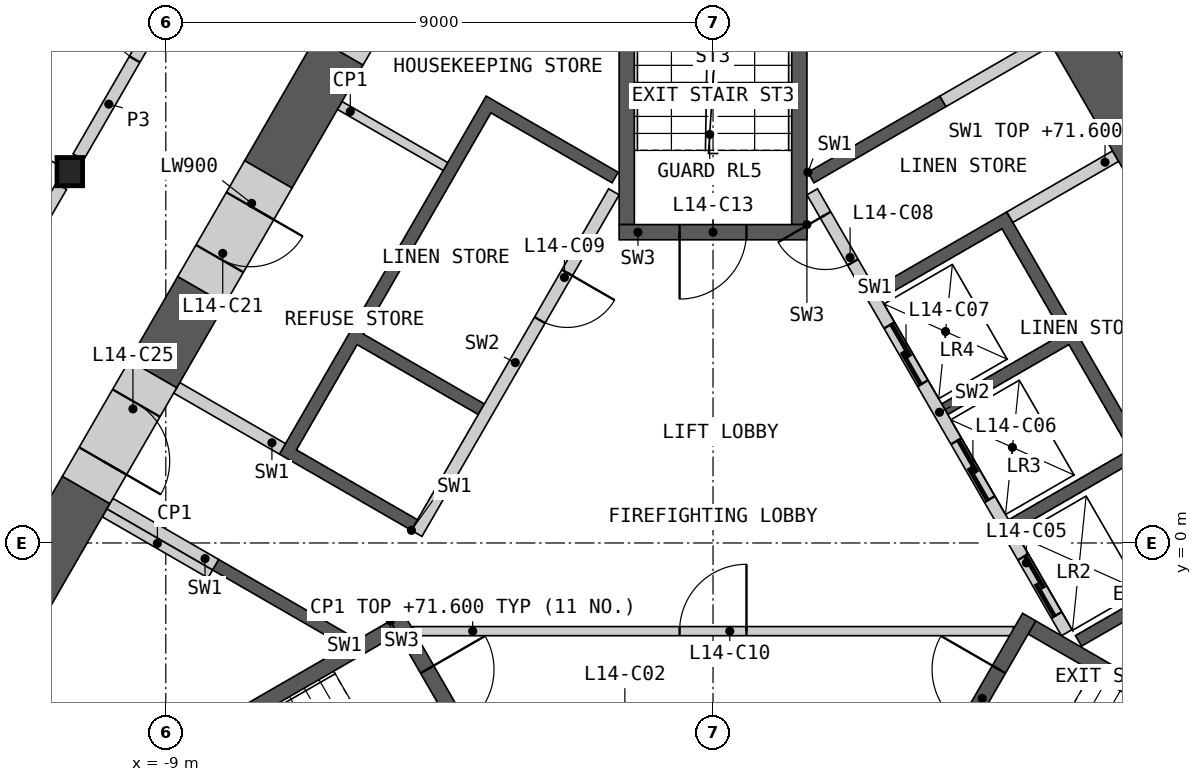
"""IFC4 building model, lengths in metres.
Left out: names, types, materials, properties, quantities, classifications, styles, units other than length and angle.
Written with IfcOpenShell. Run it as: python <this file> out.ifc"""

import sys

from ifc_helpers import new_model, si_unit, direction, frame, frame_2d, origin, origin_2d, place, context, subcontext, project, spatial, polyline, rectangle, i_section, outline, extrude, element, fill, save


model = new_model("IFC4")
c1 = context("Model", 3, precision=1e-05, world=origin(), true_north=direction((0.0, 1.0)))
c2 = subcontext(c1, "Body", "Model", "MODEL_VIEW")
j1 = project(units=[si_unit("LENGTHUNIT", "METRE"), si_unit("PLANEANGLEUNIT", "RADIAN")], contexts=[c1])
p1 = place(None, origin())
s1 = spatial("IfcSite", under=j1, at=p1, CompositionType="ELEMENT")
p2 = place(p1, origin())
s2 = spatial("IfcBuilding", under=s1, at=p2, CompositionType="ELEMENT")
p3 = place(p2, frame((0.0, 0.0, 67.8)))
s3 = spatial("IfcBuildingStorey", under=s2, at=p3, CompositionType="ELEMENT", Elevation=67.8)
p4 = place(p3, frame((-10.578, 6.107, 0.0), z_axis=(0.0, 0.0, 1.0), x_axis=(1.0, 0.0, 0.0)))
e1 = element("IfcColumn", 1, at=p4, inside=s3, PredefinedType="COLUMN", context=c2, shape_type="SweptSolid", body=[
    extrude(i_section(OverallWidth=0.421, OverallDepth=0.465, WebThickness=0.045, FlangeThickness=0.072, at=origin_2d()), origin(), (0.0, 0.0, 1.0), 4.2),
])
p5 = place(p3, origin())
e2 = element("IfcWall", 2, at=p5, inside=s3, PredefinedType="SHEAR", context=c2, shape_type="SweptSolid", body=[
    extrude(outline(polyline([(1.561, 6.097), (3.731, 7.35), (3.831, 7.177), (1.66, 5.924), (1.561, 6.097)])), origin(), (0.0, 0.0, 1.0), 3.8),
])
p6 = place(p3, origin())
e3 = element("IfcWall", 3, at=p6, inside=s3, PredefinedType="SHEAR", context=c2, shape_type="SweptSolid", body=[
    extrude(outline(polyline([(2.66, 4.192), (4.831, 5.445), (8.231, -0.444), (6.061, -1.697), (5.96, -1.524), (7.952, -0.374), (6.952, 1.358), (4.96, 0.208), (4.861, 0.381), (6.852, 1.531), (5.852, 3.263), (3.861, 2.113), (3.76, 2.287), (5.752, 3.437), (4.752, 5.169), (2.76, 4.019), (2.66, 4.192)])), origin(), (0.0, 0.0, 1.0), 3.8),
])
p7 = place(p3, frame((5.817, -1.476, 0.0), z_axis=(0.0, 0.0, 1.0), x_axis=(-0.500002616675, 0.866023893041, 0.0)))
e4 = element("IfcWall", 4, at=p7, inside=s3, PredefinedType="SOLIDWALL", context=c2, shape_type="SweptSolid", body=[
    extrude(rectangle(XDim=8.373, YDim=0.2, at=frame_2d((4.187, 0.0))), origin(), (0.0, 0.0, 1.0), 3.8),
])
p8 = place(p7, frame((0.337, 0.0, 0.0)))
e5 = element("IfcOpeningElement", 5, at=p8, cuts=e4, PredefinedType="OPENING", context=c2, shape_type="SweptSolid", body=[
    extrude(rectangle(XDim=1.1, YDim=2.1, at=frame_2d((0.55, 1.05))), frame((0.0, 0.11, 0.0), z_axis=(0.0, -1.0, 0.0), x_axis=(1.0, 0.0, 0.0)), (0.0, 0.0, 1.0), 0.22),
])
p9 = place(p7, frame((2.537, 0.0, 0.0)))
e6 = element("IfcOpeningElement", 6, at=p9, cuts=e4, PredefinedType="OPENING", context=c2, shape_type="SweptSolid", body=[
    extrude(rectangle(XDim=1.1, YDim=2.1, at=frame_2d((0.55, 1.05))), frame((0.0, 0.11, 0.0), z_axis=(0.0, -1.0, 0.0), x_axis=(1.0, 0.0, 0.0)), (0.0, 0.0, 1.0), 0.22),
])
p10 = place(p7, frame((4.737, 0.0, 0.0)))
e7 = element("IfcOpeningElement", 7, at=p10, cuts=e4, PredefinedType="OPENING", context=c2, shape_type="SweptSolid", body=[
    extrude(rectangle(XDim=1.1, YDim=2.1, at=frame_2d((0.55, 1.05))), frame((0.0, 0.11, 0.0), z_axis=(0.0, -1.0, 0.0), x_axis=(1.0, 0.0, 0.0)), (0.0, 0.0, 1.0), 0.22),
])
p11 = place(p7, frame((7.037, 0.0, 0.0)))
e8 = element("IfcOpeningElement", 8, at=p11, cuts=e4, PredefinedType="OPENING", context=c2, shape_type="SweptSolid", body=[
    extrude(rectangle(XDim=0.9, YDim=2.1, at=frame_2d((0.45, 1.05))), frame((0.0, 0.11, 0.0), z_axis=(0.0, -1.0, 0.0), x_axis=(1.0, 0.0, 0.0)), (0.0, 0.0, 1.0), 0.22),
])
p12 = place(p3, frame((4.881, 5.358, 0.0), z_axis=(0.0, 0.0, 1.0), x_axis=(0.866035824272, 0.499981950752, 0.0)))
e9 = element("IfcWall", 9, at=p12, inside=s3, PredefinedType="SHEAR", context=c2, shape_type="SweptSolid", body=[
    extrude(rectangle(XDim=2.009, YDim=0.2, at=frame_2d((1.004, 0.0))), origin(), (0.0, 0.0, 1.0), 3.8),
])
p13 = place(p3, frame((3.781, 7.263, 0.0), z_axis=(0.0, 0.0, 1.0), x_axis=(0.865983199114, 0.50007309351, 0.0)))
e10 = element("IfcWall", 10, at=p13, inside=s3, PredefinedType="SHEAR", context=c2, shape_type="SweptSolid", body=[
    extrude(rectangle(XDim=2.009, YDim=0.2, at=frame_2d((1.004, 0.0))), origin(), (0.0, 0.0, 1.0), 3.8),
])
p14 = place(p3, origin())
e11 = element("IfcWall", 11, at=p14, inside=s3, PredefinedType="SHEAR", context=c2, shape_type="SweptSolid", body=[
    extrude(outline(polyline([(-6.061, -1.697), (-8.231, -0.444), (-8.131, -0.271), (-5.96, -1.524), (-6.061, -1.697)])), origin(), (0.0, 0.0, 1.0), 3.8),
])
p15 = place(p3, origin())
e12 = element("IfcWall", 12, at=p15, inside=s3, PredefinedType="SHEAR", context=c2, shape_type="SweptSolid", body=[
    extrude(outline(polyline([(-4.96, 0.208), (-7.131, 1.461), (-3.731, 7.35), (-1.561, 6.097), (-1.66, 5.924), (-3.652, 7.074), (-5.752, 3.437), (-3.76, 2.287), (-3.861, 2.113), (-5.852, 3.263), (-6.852, 1.531), (-4.861, 0.381), (-4.96, 0.208)])), origin(), (0.0, 0.0, 1.0), 3.8),
])
p16 = place(p3, frame((-1.631, 5.776, 0.0), z_axis=(0.0, 0.0, 1.0), x_axis=(-0.499992876559, -0.866029516466, 0.0)))
e13 = element("IfcWall", 13, at=p16, inside=s3, PredefinedType="SOLIDWALL", context=c2, shape_type="SweptSolid", body=[
    extrude(rectangle(XDim=6.486, YDim=0.2, at=frame_2d((3.243, 0.0))), origin(), (0.0, 0.0, 1.0), 3.8),
])
p17 = place(p16, frame((1.537, 0.0, 0.0)))
e14 = element("IfcOpeningElement", 14, at=p17, cuts=e13, PredefinedType="OPENING", context=c2, shape_type="SweptSolid", body=[
    extrude(rectangle(XDim=0.9, YDim=2.1, at=frame_2d((0.45, 1.05))), frame((0.0, 0.11, 0.0), z_axis=(0.0, -1.0, 0.0), x_axis=(1.0, 0.0, 0.0)), (0.0, 0.0, 1.0), 0.22),
])
p18 = place(p3, frame((-7.081, 1.548, 0.0), z_axis=(0.0, 0.0, 1.0), x_axis=(-0.865983199114, 0.50007309351, 0.0)))
e15 = element("IfcWall", 15, at=p18, inside=s3, PredefinedType="SHEAR", context=c2, shape_type="SweptSolid", body=[
    extrude(rectangle(XDim=2.009, YDim=0.2, at=frame_2d((1.004, 0.0))), origin(), (0.0, 0.0, 1.0), 3.8),
])
p19 = place(p3, frame((-8.181, -0.357, 0.0), z_axis=(0.0, 0.0, 1.0), x_axis=(-0.866035824272, 0.499981950752, 0.0)))
e16 = element("IfcWall", 16, at=p19, inside=s3, PredefinedType="SHEAR", context=c2, shape_type="SweptSolid", body=[
    extrude(rectangle(XDim=2.009, YDim=0.2, at=frame_2d((1.004, 0.0))), origin(), (0.0, 0.0, 1.0), 3.8),
])
p20 = place(p3, frame((-4.941, -1.45, 0.0), z_axis=(0.0, 0.0, 1.0), x_axis=(1.0, 0.0, 0.0)))
e17 = element("IfcWall", 17, at=p20, inside=s3, PredefinedType="PARTITIONING", context=c2, shape_type="SweptSolid", body=[
    extrude(rectangle(XDim=9.882, YDim=0.15, at=frame_2d((4.941, 0.0))), origin(), (0.0, 0.0, 1.0), 3.8),
])
p21 = place(p20, frame((4.391, 0.0, 0.0)))
e18 = element("IfcOpeningElement", 18, at=p21, cuts=e17, PredefinedType="OPENING", context=c2, shape_type="SweptSolid", body=[
    extrude(rectangle(XDim=1.1, YDim=2.1, at=frame_2d((0.55, 1.05))), frame((0.0, 0.085, 0.0), z_axis=(0.0, -1.0, 0.0), x_axis=(1.0, 0.0, 0.0)), (0.0, 0.0, 1.0), 0.17),
])
p22 = place(p3, origin())
e19 = element("IfcWall", 19, at=p22, inside=s3, PredefinedType="SHEAR", context=c2, shape_type="SweptSolid", body=[
    extrude(outline(polyline([(-5.307, -1.281), (-10.374, -4.206), (-10.032, -4.298), (-5.182, -1.498), (-5.307, -1.281)])), origin(), (0.0, 0.0, 1.0), 3.8),
])
p23 = place(p3, frame((-5.199, -1.219, 0.0), z_axis=(0.0, 0.0, 1.0), x_axis=(0.499982516597, -0.866035497597, 0.0)))
e20 = element("IfcWall", 20, at=p23, inside=s3, PredefinedType="SHEAR", context=c2, shape_type="SweptSolid", body=[
    extrude(rectangle(XDim=3.088, YDim=0.25, at=frame_2d((1.544, 0.0))), origin(), (0.0, 0.0, 1.0), 3.8),
])
p24 = place(p23, frame((0.994, 0.0, 0.0)))
e21 = element("IfcOpeningElement", 21, at=p24, cuts=e20, PredefinedType="OPENING", context=c2, shape_type="SweptSolid", body=[
    extrude(rectangle(XDim=1.1, YDim=2.1, at=frame_2d((0.55, 1.05))), frame((0.0, 0.135, 0.0), z_axis=(0.0, -1.0, 0.0), x_axis=(1.0, 0.0, 0.0)), (0.0, 0.0, 1.0), 0.27),
])
p25 = place(p3, origin())
e22 = element("IfcWall", 22, at=p25, inside=s3, PredefinedType="SHEAR", context=c2, shape_type="SweptSolid", body=[
    extrude(outline(polyline([(10.032, -4.298), (10.374, -4.206), (5.307, -1.281), (5.182, -1.498), (10.032, -4.298)])), origin(), (0.0, 0.0, 1.0), 3.8),
])
p26 = place(p3, frame((3.655, -3.893, 0.0), z_axis=(0.0, 0.0, 1.0), x_axis=(0.499982516597, 0.866035497597, 0.0)))
e23 = element("IfcWall", 23, at=p26, inside=s3, PredefinedType="SHEAR", context=c2, shape_type="SweptSolid", body=[
    extrude(rectangle(XDim=3.088, YDim=0.25, at=frame_2d((1.544, 0.0))), origin(), (0.0, 0.0, 1.0), 3.8),
])
p27 = place(p26, frame((0.994, 0.0, 0.0)))
e24 = element("IfcOpeningElement", 24, at=p27, cuts=e23, PredefinedType="OPENING", context=c2, shape_type="SweptSolid", body=[
    extrude(rectangle(XDim=1.1, YDim=2.1, at=frame_2d((0.55, 1.05))), frame((0.0, 0.135, 0.0), z_axis=(0.0, -1.0, 0.0), x_axis=(1.0, 0.0, 0.0)), (0.0, 0.0, 1.0), 0.27),
])
p28 = place(p3, origin())
e25 = element("IfcWall", 25, at=p28, inside=s3, PredefinedType="SHEAR", context=c2, shape_type="SweptSolid", body=[
    extrude(outline(polyline([(1.544, 5.237), (1.544, 11.087), (1.294, 10.837), (1.294, 5.237), (1.544, 5.237)])), origin(), (0.0, 0.0, 1.0), 3.8),
])
p29 = place(p3, origin())
e26 = element("IfcWall", 26, at=p29, inside=s3, PredefinedType="SHEAR", context=c2, shape_type="SweptSolid", body=[
    extrude(outline(polyline([(-1.294, 10.837), (-1.544, 11.087), (-1.544, 5.237), (-1.294, 5.237), (-1.294, 10.837)])), origin(), (0.0, 0.0, 1.0), 3.8),
])
p30 = place(p3, frame((1.544, 5.112, 0.0), z_axis=(0.0, 0.0, 1.0), x_axis=(-1.0, 0.0, 0.0)))
e27 = element("IfcWall", 27, at=p30, inside=s3, PredefinedType="SHEAR", context=c2, shape_type="SweptSolid", body=[
    extrude(rectangle(XDim=3.088, YDim=0.25, at=frame_2d((1.544, 0.0))), origin(), (0.0, 0.0, 1.0), 3.8),
])
p31 = place(p30, frame((0.994, 0.0, 0.0)))
e28 = element("IfcOpeningElement", 28, at=p31, cuts=e27, PredefinedType="OPENING", context=c2, shape_type="SweptSolid", body=[
    extrude(rectangle(XDim=1.1, YDim=2.1, at=frame_2d((0.55, 1.05))), frame((0.0, 0.135, 0.0), z_axis=(0.0, -1.0, 0.0), x_axis=(1.0, 0.0, 0.0)), (0.0, 0.0, 1.0), 0.27),
])
for number, where, z_axis, x_axis in (
    (29, (-8.268, -0.509, 0.0), (0.0, 0.0, 1.0), (-0.866, 0.5, 0.0)),
    (30, (-6.139, 7.196, 0.0), (0.0, 0.0, 1.0), (0.866, -0.5, 0.0)),
):
    element("IfcWall", number, at=place(p3, frame(where, z_axis=z_axis, x_axis=x_axis)), inside=s3, PredefinedType="PARTITIONING", context=c2, shape_type="SweptSolid", body=[
        extrude(rectangle(XDim=2.009, YDim=0.15, at=frame_2d((1.004, 0.0))), origin(), (0.0, 0.0, 1.0), 3.8),
    ])
p32 = place(p3, frame((7.807, 5.208, 0.0), z_axis=(0.0, 0.0, 1.0), x_axis=(-0.499986664161, 0.866033103098, 0.0)))
e31 = element("IfcWall", 31, at=p32, inside=s3, PredefinedType="SHEAR", context=c2, shape_type="SweptSolid", body=[
    extrude(rectangle(XDim=6.586, YDim=0.9, at=frame_2d((3.293, 0.0))), origin(), (0.0, 0.0, 1.0), 3.8),
])
p33 = place(p3, frame((-10.31, 0.872, 0.0), z_axis=(0.0, 0.0, 1.0), x_axis=(-0.499946751862, -0.866056144429, 0.0)))
e32 = element("IfcWall", 32, at=p33, inside=s3, PredefinedType="SHEAR", context=c2, shape_type="SweptSolid", body=[
    extrude(rectangle(XDim=2.889, YDim=0.9, at=frame_2d((1.445, 0.0))), origin(), (0.0, 0.0, 1.0), 3.8),
])
p34 = place(p3, frame((-6.145, 8.086, 0.0), z_axis=(0.0, 0.0, 1.0), x_axis=(-0.500026924946, -0.866009858102, 0.0)))
e33 = element("IfcWall", 33, at=p34, inside=s3, PredefinedType="SHEAR", context=c2, shape_type="SweptSolid", body=[
    extrude(rectangle(XDim=2.337, YDim=0.9, at=frame_2d((1.168, 0.0))), origin(), (0.0, 0.0, 1.0), 3.8),
])
p35 = place(p3, frame((-8.413, 4.157, 0.0), z_axis=(0.0, 0.0, 1.0), x_axis=(-0.499961121316, -0.86604784924, 0.0)))
e34 = element("IfcWall", 34, at=p35, inside=s3, PredefinedType="SHEAR", context=c2, shape_type="SweptSolid", body=[
    extrude(rectangle(XDim=1.594, YDim=0.9, at=frame_2d((0.797, 0.0))), origin(), (0.0, 0.0, 1.0), 3.8),
])
p36 = place(p3, frame((-7.313, 6.062, 0.0), z_axis=(0.0, 0.0, 1.0), x_axis=(-0.500077893725, -0.86598042715, 0.0)))
e35 = element("IfcWall", 35, at=p36, inside=s3, PredefinedType="SHEAR", context=c2, shape_type="SweptSolid", body=[
    extrude(rectangle(XDim=2.2, YDim=0.9, at=frame_2d((1.1, 0.0))), origin(), (0.0, 0.0, 1.0), 3.8),
])
p37 = place(p36, frame((0.6, 0.0, 0.0)))
e36 = element("IfcOpeningElement", 36, at=p37, cuts=e35, PredefinedType="OPENING", context=c2, shape_type="SweptSolid", body=[
    extrude(rectangle(XDim=1.0, YDim=2.1, at=frame_2d((0.5, 1.05))), frame((0.0, 0.46, 0.0), z_axis=(0.0, -1.0, 0.0), x_axis=(1.0, 0.0, 0.0)), (0.0, 0.0, 1.0), 0.92),
])
p38 = place(p3, frame((-5.045, 9.992, 0.0), z_axis=(0.0, 0.0, 1.0), x_axis=(-0.499898558967, -0.866083962871, 0.0)))
e37 = element("IfcWall", 37, at=p38, inside=s3, PredefinedType="SHEAR", context=c2, shape_type="SweptSolid", body=[
    extrude(rectangle(XDim=2.2, YDim=0.9, at=frame_2d((1.1, 0.0))), origin(), (0.0, 0.0, 1.0), 3.8),
])
p39 = place(p38, frame((0.6, 0.0, 0.0)))
e38 = element("IfcOpeningElement", 38, at=p39, cuts=e37, PredefinedType="OPENING", context=c2, shape_type="SweptSolid", body=[
    extrude(rectangle(XDim=1.0, YDim=2.1, at=frame_2d((0.5, 1.05))), frame((0.0, 0.46, 0.0), z_axis=(0.0, -1.0, 0.0), x_axis=(1.0, 0.0, 0.0)), (0.0, 0.0, 1.0), 0.92),
])
p40 = place(p3, frame((-9.21, 2.777, 0.0), z_axis=(0.0, 0.0, 1.0), x_axis=(-0.500077893725, -0.86598042715, 0.0)))
e39 = element("IfcWall", 39, at=p40, inside=s3, PredefinedType="SHEAR", context=c2, shape_type="SweptSolid", body=[
    extrude(rectangle(XDim=2.2, YDim=0.9, at=frame_2d((1.1, 0.0))), origin(), (0.0, 0.0, 1.0), 3.8),
])
p41 = place(p40, frame((0.55, 0.0, 0.0)))
e40 = element("IfcOpeningElement", 40, at=p41, cuts=e39, PredefinedType="OPENING", context=c2, shape_type="SweptSolid", body=[
    extrude(rectangle(XDim=1.1, YDim=2.1, at=frame_2d((0.55, 1.05))), frame((0.0, 0.46, 0.0), z_axis=(0.0, -1.0, 0.0), x_axis=(1.0, 0.0, 0.0)), (0.0, 0.0, 1.0), 0.92),
])
p42 = place(p3, frame((-15.728, -2.811, 0.0), z_axis=(0.0, 0.0, 1.0), x_axis=(0.49999175339, 0.866030164915, 0.0)))
e41 = element("IfcWall", 41, at=p42, inside=s3, PredefinedType="PARTITIONING", context=c2, shape_type="SweptSolid", body=[
    extrude(rectangle(XDim=10.019, YDim=0.2, at=frame_2d((5.009, 0.0))), origin(), (0.0, 0.0, 1.0), 3.8),
])
p43 = place(p42, frame((2.154, 0.0, 0.0)))
e42 = element("IfcOpeningElement", 42, at=p43, cuts=e41, PredefinedType="OPENING", context=c2, shape_type="SweptSolid", body=[
    extrude(rectangle(XDim=1.0, YDim=2.1, at=frame_2d((0.5, 1.05))), frame((0.0, 0.11, 0.0), z_axis=(0.0, -1.0, 0.0), x_axis=(1.0, 0.0, 0.0)), (0.0, 0.0, 1.0), 0.22),
])
p44 = place(p3, frame((-10.439, 6.35, 0.0), z_axis=(0.0, 0.0, 1.0), x_axis=(0.50001002959, 0.86601961312, 0.0)))
e43 = element("IfcWall", 43, at=p44, inside=s3, PredefinedType="PARTITIONING", context=c2, shape_type="SweptSolid", body=[
    extrude(rectangle(XDim=10.019, YDim=0.2, at=frame_2d((5.009, 0.0))), origin(), (0.0, 0.0, 1.0), 3.8),
])
p45 = place(p44, frame((6.865, 0.0, 0.0)))
e44 = element("IfcOpeningElement", 44, at=p45, cuts=e43, PredefinedType="OPENING", context=c2, shape_type="SweptSolid", body=[
    extrude(rectangle(XDim=1.0, YDim=2.1, at=frame_2d((0.5, 1.05))), frame((0.0, 0.11, 0.0), z_axis=(0.0, -1.0, 0.0), x_axis=(1.0, 0.0, 0.0)), (0.0, 0.0, 1.0), 0.22),
])
p46 = place(p44, frame((1.854, 0.0, 0.0)))
e45 = element("IfcOpeningElement", 45, at=p46, cuts=e43, PredefinedType="OPENING", context=c2, shape_type="SweptSolid", body=[
    extrude(rectangle(XDim=1.0, YDim=2.1, at=frame_2d((0.5, 1.05))), frame((0.0, 0.11, 0.0), z_axis=(0.0, -1.0, 0.0), x_axis=(1.0, 0.0, 0.0)), (0.0, 0.0, 1.0), 0.22),
])
p47 = place(p3, frame((5.429, 15.026, 0.0), z_axis=(0.0, 0.0, 1.0), x_axis=(0.50001002959, -0.86601961312, 0.0)))
e46 = element("IfcWall", 46, at=p47, inside=s3, PredefinedType="PARTITIONING", context=c2, shape_type="SweptSolid", body=[
    extrude(rectangle(XDim=10.019, YDim=0.2, at=frame_2d((5.009, 0.0))), origin(), (0.0, 0.0, 1.0), 3.8),
])
p48 = place(p47, frame((7.165, 0.0, 0.0)))
e47 = element("IfcOpeningElement", 47, at=p48, cuts=e46, PredefinedType="OPENING", context=c2, shape_type="SweptSolid", body=[
    extrude(rectangle(XDim=1.0, YDim=2.1, at=frame_2d((0.5, 1.05))), frame((0.0, 0.11, 0.0), z_axis=(0.0, -1.0, 0.0), x_axis=(1.0, 0.0, 0.0)), (0.0, 0.0, 1.0), 0.22),
])
p49 = place(p8, origin())
e48 = element("IfcDoor", 48, at=p49, inside=s3, OperationType="SLIDING_TO_LEFT", PredefinedType="DOOR", context=c2, shape_type="SweptSolid", body=[
    extrude(rectangle(XDim=1.1, YDim=2.1, at=frame_2d((0.55, 1.05))), frame((0.0, 0.025, 0.0), z_axis=(0.0, -1.0, 0.0), x_axis=(1.0, 0.0, 0.0)), (0.0, 0.0, 1.0), 0.05),
])
fill(e5, e48)
p50 = place(p9, origin())
e49 = element("IfcDoor", 49, at=p50, inside=s3, OperationType="SLIDING_TO_LEFT", PredefinedType="DOOR", context=c2, shape_type="SweptSolid", body=[
    extrude(rectangle(XDim=1.1, YDim=2.1, at=frame_2d((0.55, 1.05))), frame((0.0, 0.025, 0.0), z_axis=(0.0, -1.0, 0.0), x_axis=(1.0, 0.0, 0.0)), (0.0, 0.0, 1.0), 0.05),
])
fill(e6, e49)
p51 = place(p10, origin())
e50 = element("IfcDoor", 50, at=p51, inside=s3, OperationType="SLIDING_TO_LEFT", PredefinedType="DOOR", context=c2, shape_type="SweptSolid", body=[
    extrude(rectangle(XDim=1.1, YDim=2.1, at=frame_2d((0.55, 1.05))), frame((0.0, 0.025, 0.0), z_axis=(0.0, -1.0, 0.0), x_axis=(1.0, 0.0, 0.0)), (0.0, 0.0, 1.0), 0.05),
])
fill(e7, e50)
p52 = place(p11, origin())
e51 = element("IfcDoor", 51, at=p52, inside=s3, OperationType="SINGLE_SWING_RIGHT", PredefinedType="DOOR", context=c2, shape_type="SweptSolid", body=[
    extrude(rectangle(XDim=0.9, YDim=2.1, at=frame_2d((0.45, 1.05))), frame((0.0, 0.025, 0.0), z_axis=(0.0, -1.0, 0.0), x_axis=(1.0, 0.0, 0.0)), (0.0, 0.0, 1.0), 0.05),
])
fill(e8, e51)
p53 = place(p17, origin())
e52 = element("IfcDoor", 52, at=p53, inside=s3, OperationType="SINGLE_SWING_LEFT", PredefinedType="DOOR", context=c2, shape_type="SweptSolid", body=[
    extrude(rectangle(XDim=0.9, YDim=2.1, at=frame_2d((0.45, 1.05))), frame((0.0, 0.025, 0.0), z_axis=(0.0, -1.0, 0.0), x_axis=(1.0, 0.0, 0.0)), (0.0, 0.0, 1.0), 0.05),
])
fill(e14, e52)
p54 = place(p21, origin())
e53 = element("IfcDoor", 53, at=p54, inside=s3, OperationType="SINGLE_SWING_RIGHT", PredefinedType="DOOR", context=c2, shape_type="SweptSolid", body=[
    extrude(rectangle(XDim=1.1, YDim=2.1, at=frame_2d((0.55, 1.05))), frame((0.0, 0.025, 0.0), z_axis=(0.0, -1.0, 0.0), x_axis=(1.0, 0.0, 0.0)), (0.0, 0.0, 1.0), 0.05),
])
fill(e18, e53)
p55 = place(p24, origin())
e54 = element("IfcDoor", 54, at=p55, inside=s3, OperationType="SINGLE_SWING_LEFT", PredefinedType="DOOR", context=c2, shape_type="SweptSolid", body=[
    extrude(rectangle(XDim=1.1, YDim=2.1, at=frame_2d((0.55, 1.05))), frame((0.0, 0.025, 0.0), z_axis=(0.0, -1.0, 0.0), x_axis=(1.0, 0.0, 0.0)), (0.0, 0.0, 1.0), 0.05),
])
fill(e21, e54)
p56 = place(p27, origin())
e55 = element("IfcDoor", 55, at=p56, inside=s3, OperationType="SINGLE_SWING_RIGHT", PredefinedType="DOOR", context=c2, shape_type="SweptSolid", body=[
    extrude(rectangle(XDim=1.1, YDim=2.1, at=frame_2d((0.55, 1.05))), frame((0.0, 0.025, 0.0), z_axis=(0.0, -1.0, 0.0), x_axis=(1.0, 0.0, 0.0)), (0.0, 0.0, 1.0), 0.05),
])
fill(e24, e55)
p57 = place(p31, origin())
e56 = element("IfcDoor", 56, at=p57, inside=s3, OperationType="SINGLE_SWING_RIGHT", PredefinedType="DOOR", context=c2, shape_type="SweptSolid", body=[
    extrude(rectangle(XDim=1.1, YDim=2.1, at=frame_2d((0.55, 1.05))), frame((0.0, 0.025, 0.0), z_axis=(0.0, -1.0, 0.0), x_axis=(1.0, 0.0, 0.0)), (0.0, 0.0, 1.0), 0.05),
])
fill(e28, e56)
p58 = place(p37, origin())
e57 = element("IfcDoor", 57, at=p58, inside=s3, OperationType="SINGLE_SWING_LEFT", PredefinedType="DOOR", context=c2, shape_type="SweptSolid", body=[
    extrude(rectangle(XDim=1.0, YDim=2.1, at=frame_2d((0.5, 1.05))), frame((0.0, 0.205, 0.0), z_axis=(0.0, -1.0, 0.0), x_axis=(1.0, 0.0, 0.0)), (0.0, 0.0, 1.0), 0.05),
])
fill(e36, e57)
p59 = place(p41, origin())
e58 = element("IfcDoor", 58, at=p59, inside=s3, OperationType="SINGLE_SWING_RIGHT", PredefinedType="DOOR", context=c2, shape_type="SweptSolid", body=[
    extrude(rectangle(XDim=1.1, YDim=2.1, at=frame_2d((0.55, 1.05))), frame((0.0, 0.205, 0.0), z_axis=(0.0, -1.0, 0.0), x_axis=(1.0, 0.0, 0.0)), (0.0, 0.0, 1.0), 0.05),
])
fill(e40, e58)
p60 = place(p46, origin())
e59 = element("IfcDoor", 59, at=p60, inside=s3, OperationType="SINGLE_SWING_RIGHT", PredefinedType="DOOR", context=c2, shape_type="SweptSolid", body=[
    extrude(rectangle(XDim=1.0, YDim=2.1, at=frame_2d((0.5, 1.05))), frame((0.0, 0.025, 0.0), z_axis=(0.0, -1.0, 0.0), x_axis=(1.0, 0.0, 0.0)), (0.0, 0.0, 1.0), 0.05),
])
fill(e45, e59)
save(model, sys.argv[1])
